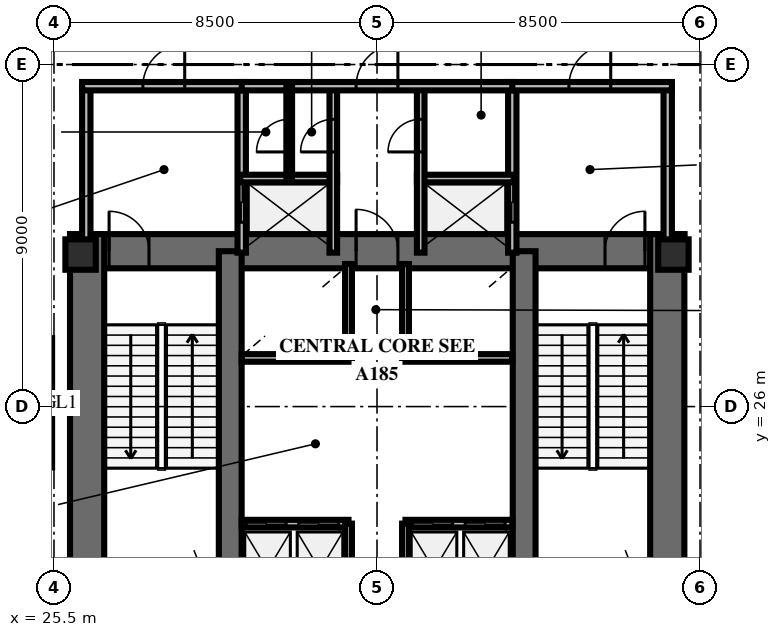
"""IFC4 building model, lengths in metres.
Left out: names, types, materials, properties, quantities, classifications, styles, units other than length and angle.
Written with IfcOpenShell. Run it as: python <this file> out.ifc"""

import sys

from ifc_helpers import new_model, si_unit, direction, frame, frame_2d, origin, origin_2d, place, context, subcontext, project, spatial, rectangle, extrude, element, fill, save


model = new_model("IFC4")
c1 = context("Model", 3, precision=1e-05, world=origin(), true_north=direction((0.0, 1.0)))
c2 = subcontext(c1, "Body", "Model", "MODEL_VIEW")
j1 = project(units=[si_unit("LENGTHUNIT", "METRE"), si_unit("PLANEANGLEUNIT", "RADIAN")], contexts=[c1])
p1 = place(None, origin())
s1 = spatial("IfcSite", under=j1, at=p1, CompositionType="ELEMENT")
p2 = place(p1, origin())
s2 = spatial("IfcBuilding", under=s1, at=p2, CompositionType="ELEMENT")
p3 = place(p2, frame((0.0, 0.0, 5.4)))
s3 = spatial("IfcBuildingStorey", under=s2, at=p3, CompositionType="ELEMENT", Elevation=5.4)
p4 = place(p3, frame((25.922, 30.088, 0.0), z_axis=(0.0, 0.0, 1.0), x_axis=(1.0, 0.0, 0.0)))
e1 = element("IfcWall", 1, at=p4, inside=s3, PredefinedType="SHEAR", context=c2, shape_type="SweptSolid", body=[
    extrude(rectangle(XDim=16.166, YDim=0.9, at=frame_2d((8.083, 0.0))), origin(), (0.0, 0.0, 1.0), 4.8),
])
p5 = place(p4, frame((1.028, 0.0, 0.0)))
e2 = element("IfcOpeningElement", 2, at=p5, cuts=e1, PredefinedType="OPENING", context=c2, shape_type="SweptSolid", body=[
    extrude(rectangle(XDim=1.05, YDim=2.15, at=frame_2d((0.525, 1.075))), frame((0.0, 0.46, 0.0), z_axis=(0.0, -1.0, 0.0), x_axis=(1.0, 0.0, 0.0)), (0.0, 0.0, 1.0), 0.92),
])
p6 = place(p4, frame((14.078, 0.0, 0.0)))
e3 = element("IfcOpeningElement", 3, at=p6, cuts=e1, PredefinedType="OPENING", context=c2, shape_type="SweptSolid", body=[
    extrude(rectangle(XDim=1.05, YDim=2.15, at=frame_2d((0.525, 1.075))), frame((0.0, 0.46, 0.0), z_axis=(0.0, -1.0, 0.0), x_axis=(1.0, 0.0, 0.0)), (0.0, 0.0, 1.0), 0.92),
])
p7 = place(p4, frame((7.528, 0.0, 0.0)))
e4 = element("IfcOpeningElement", 4, at=p7, cuts=e1, PredefinedType="OPENING", context=c2, shape_type="SweptSolid", body=[
    extrude(rectangle(XDim=1.1, YDim=2.15, at=frame_2d((0.55, 1.075))), frame((0.0, 0.46, 0.0), z_axis=(0.0, -1.0, 0.0), x_axis=(1.0, 0.0, 0.0)), (0.0, 0.0, 1.0), 0.92),
])
for number, where, z_axis, x_axis in (
    (5, (26.372, 19.662, 0.0), (0.0, 0.0, 1.0), (0.0, 1.0, 0.0)),
    (6, (41.638, 19.662, 0.0), (0.0, 0.0, 1.0), (0.0, 1.0, 0.0)),
):
    element("IfcWall", number, at=place(p3, frame(where, z_axis=z_axis, x_axis=x_axis)), inside=s3, PredefinedType="SHEAR", context=c2, shape_type="SweptSolid", body=[
        extrude(rectangle(XDim=10.876, YDim=0.9, at=frame_2d((5.438, 0.0))), origin(), (0.0, 0.0, 1.0), 4.8),
    ])
for number, where, z_axis, x_axis in (
    (7, (30.138, 20.112, 0.0), (0.0, 0.0, 1.0), (0.0, 1.0, 0.0)),
    (8, (37.872, 20.112, 0.0), (0.0, 0.0, 1.0), (0.0, 1.0, 0.0)),
):
    element("IfcWall", number, at=place(p3, frame(where, z_axis=z_axis, x_axis=x_axis)), inside=s3, PredefinedType="SHEAR", context=c2, shape_type="SweptSolid", body=[
        extrude(rectangle(XDim=9.976, YDim=0.6, at=frame_2d((4.988, 0.0))), origin(), (0.0, 0.0, 1.0), 4.8),
    ])
for number, where, z_axis, x_axis in (
    (9, (26.2, 30.0, 0.0), (0.0, 0.0, 1.0), (1.0, 0.0, 0.0)),
    (10, (41.8, 30.0, 0.0), (0.0, 0.0, 1.0), (1.0, 0.0, 0.0)),
):
    element("IfcColumn", number, at=place(p3, frame(where, z_axis=z_axis, x_axis=x_axis)), inside=s3, PredefinedType="PILASTER", context=c2, shape_type="SweptSolid", body=[
        extrude(rectangle(XDim=0.8, YDim=0.8, at=origin_2d()), origin(), (0.0, 0.0, 1.0), 4.8),
    ])
p8 = place(p3, frame((26.35, 30.05, 0.0), z_axis=(0.0, 0.0, 1.0), x_axis=(0.0, 1.0, 0.0)))
e11 = element("IfcWall", 11, at=p8, inside=s3, PredefinedType="SOLIDWALL", context=c2, shape_type="SweptSolid", body=[
    extrude(rectangle(XDim=4.38, YDim=0.22, at=frame_2d((2.19, 0.0))), origin(), (0.0, 0.0, 1.0), 3.56),
])
p9 = place(p3, frame((30.44, 30.05, 0.0), z_axis=(0.0, 0.0, 1.0), x_axis=(0.0, 1.0, 0.0)))
e12 = element("IfcWall", 12, at=p9, inside=s3, PredefinedType="SOLIDWALL", context=c2, shape_type="SweptSolid", body=[
    extrude(rectangle(XDim=4.38, YDim=0.22, at=frame_2d((2.19, 0.0))), origin(), (0.0, 0.0, 1.0), 3.56),
])
p10 = place(p9, frame((0.8, 0.0, 0.0)))
e13 = element("IfcOpeningElement", 13, at=p10, cuts=e12, PredefinedType="OPENING", context=c2, shape_type="SweptSolid", body=[
    extrude(rectangle(XDim=1.05, YDim=2.1, at=frame_2d((0.525, 1.05))), frame((0.0, 0.12, 0.0), z_axis=(0.0, -1.0, 0.0), x_axis=(1.0, 0.0, 0.0)), (0.0, 0.0, 1.0), 0.24),
])
p11 = place(p3, frame((26.24, 34.43, 0.0), z_axis=(0.0, 0.0, 1.0), x_axis=(1.0, 0.0, 0.0)))
e14 = element("IfcWall", 14, at=p11, inside=s3, PredefinedType="SOLIDWALL", context=c2, shape_type="SweptSolid", body=[
    extrude(rectangle(XDim=4.31, YDim=0.22, at=frame_2d((2.155, 0.0))), origin(), (0.0, 0.0, 1.0), 3.56),
])
p12 = place(p11, frame((1.6, 0.0, 0.0)))
e15 = element("IfcOpeningElement", 15, at=p12, cuts=e14, PredefinedType="OPENING", context=c2, shape_type="SweptSolid", body=[
    extrude(rectangle(XDim=1.1, YDim=2.15, at=frame_2d((0.55, 1.075))), frame((0.0, 0.12, 0.0), z_axis=(0.0, -1.0, 0.0), x_axis=(1.0, 0.0, 0.0)), (0.0, 0.0, 1.0), 0.24),
])
p13 = place(p3, frame((30.4, 32.0, 0.0), z_axis=(0.0, 0.0, 1.0), x_axis=(1.0, 0.0, 0.0)))
e16 = element("IfcWall", 16, at=p13, inside=s3, PredefinedType="SOLIDWALL", context=c2, shape_type="SweptSolid", body=[
    extrude(rectangle(XDim=2.55, YDim=0.2, at=frame_2d((1.275, 0.0))), origin(), (0.0, 0.0, 1.0), 3.56),
])
p14 = place(p3, frame((32.85, 30.05, 0.0), z_axis=(0.0, 0.0, 1.0), x_axis=(0.0, 1.0, 0.0)))
e17 = element("IfcWall", 17, at=p14, inside=s3, PredefinedType="SOLIDWALL", context=c2, shape_type="SweptSolid", body=[
    extrude(rectangle(XDim=4.38, YDim=0.2, at=frame_2d((2.19, 0.0))), origin(), (0.0, 0.0, 1.0), 3.56),
])
p15 = place(p14, frame((2.65, 0.0, 0.0)))
e18 = element("IfcOpeningElement", 18, at=p15, cuts=e17, PredefinedType="OPENING", context=c2, shape_type="SweptSolid", body=[
    extrude(rectangle(XDim=0.86, YDim=2.05, at=frame_2d((0.43, 1.025))), frame((0.0, 0.11, 0.0), z_axis=(0.0, -1.0, 0.0), x_axis=(1.0, 0.0, 0.0)), (0.0, 0.0, 1.0), 0.22),
])
p16 = place(p3, frame((37.56, 30.05, 0.0), z_axis=(0.0, 0.0, 1.0), x_axis=(0.0, 1.0, 0.0)))
e19 = element("IfcWall", 19, at=p16, inside=s3, PredefinedType="SOLIDWALL", context=c2, shape_type="SweptSolid", body=[
    extrude(rectangle(XDim=4.38, YDim=0.22, at=frame_2d((2.19, 0.0))), origin(), (0.0, 0.0, 1.0), 3.56),
])
p17 = place(p16, frame((0.8, 0.0, 0.0)))
e20 = element("IfcOpeningElement", 20, at=p17, cuts=e19, PredefinedType="OPENING", context=c2, shape_type="SweptSolid", body=[
    extrude(rectangle(XDim=1.05, YDim=2.1, at=frame_2d((0.525, 1.05))), frame((0.0, 0.12, 0.0), z_axis=(0.0, -1.0, 0.0), x_axis=(1.0, 0.0, 0.0)), (0.0, 0.0, 1.0), 0.24),
])
p18 = place(p3, frame((41.65, 30.05, 0.0), z_axis=(0.0, 0.0, 1.0), x_axis=(0.0, 1.0, 0.0)))
e21 = element("IfcWall", 21, at=p18, inside=s3, PredefinedType="SOLIDWALL", context=c2, shape_type="SweptSolid", body=[
    extrude(rectangle(XDim=4.38, YDim=0.22, at=frame_2d((2.19, 0.0))), origin(), (0.0, 0.0, 1.0), 3.56),
])
p19 = place(p3, frame((37.45, 34.43, 0.0), z_axis=(0.0, 0.0, 1.0), x_axis=(1.0, 0.0, 0.0)))
e22 = element("IfcWall", 22, at=p19, inside=s3, PredefinedType="SOLIDWALL", context=c2, shape_type="SweptSolid", body=[
    extrude(rectangle(XDim=4.31, YDim=0.22, at=frame_2d((2.155, 0.0))), origin(), (0.0, 0.0, 1.0), 3.56),
])
p20 = place(p19, frame((1.6, 0.0, 0.0)))
e23 = element("IfcOpeningElement", 23, at=p20, cuts=e22, PredefinedType="OPENING", context=c2, shape_type="SweptSolid", body=[
    extrude(rectangle(XDim=1.1, YDim=2.15, at=frame_2d((0.55, 1.075))), frame((0.0, 0.12, 0.0), z_axis=(0.0, -1.0, 0.0), x_axis=(1.0, 0.0, 0.0)), (0.0, 0.0, 1.0), 0.24),
])
p21 = place(p3, frame((35.05, 32.0, 0.0), z_axis=(0.0, 0.0, 1.0), x_axis=(1.0, 0.0, 0.0)))
e24 = element("IfcWall", 24, at=p21, inside=s3, PredefinedType="SOLIDWALL", context=c2, shape_type="SweptSolid", body=[
    extrude(rectangle(XDim=2.55, YDim=0.2, at=frame_2d((1.275, 0.0))), origin(), (0.0, 0.0, 1.0), 3.56),
])
p22 = place(p3, frame((35.15, 30.05, 0.0), z_axis=(0.0, 0.0, 1.0), x_axis=(0.0, 1.0, 0.0)))
e25 = element("IfcWall", 25, at=p22, inside=s3, PredefinedType="SOLIDWALL", context=c2, shape_type="SweptSolid", body=[
    extrude(rectangle(XDim=4.38, YDim=0.2, at=frame_2d((2.19, 0.0))), origin(), (0.0, 0.0, 1.0), 3.56),
])
p23 = place(p22, frame((2.65, 0.0, 0.0)))
e26 = element("IfcOpeningElement", 26, at=p23, cuts=e25, PredefinedType="OPENING", context=c2, shape_type="SweptSolid", body=[
    extrude(rectangle(XDim=0.86, YDim=2.05, at=frame_2d((0.43, 1.025))), frame((0.0, 0.11, 0.0), z_axis=(0.0, -1.0, 0.0), x_axis=(1.0, 0.0, 0.0)), (0.0, 0.0, 1.0), 0.22),
])
p24 = place(p3, frame((30.44, 34.43, 0.0), z_axis=(0.0, 0.0, 1.0), x_axis=(1.0, 0.0, 0.0)))
e27 = element("IfcWall", 27, at=p24, inside=s3, PredefinedType="SOLIDWALL", context=c2, shape_type="SweptSolid", body=[
    extrude(rectangle(XDim=7.12, YDim=0.22, at=frame_2d((3.56, 0.0))), origin(), (0.0, 0.0, 1.0), 3.56),
])
p25 = place(p24, frame((3.01, 0.0, 0.0)))
e28 = element("IfcOpeningElement", 28, at=p25, cuts=e27, PredefinedType="OPENING", context=c2, shape_type="SweptSolid", body=[
    extrude(rectangle(XDim=1.1, YDim=2.15, at=frame_2d((0.55, 1.075))), frame((0.0, 0.12, 0.0), z_axis=(0.0, -1.0, 0.0), x_axis=(1.0, 0.0, 0.0)), (0.0, 0.0, 1.0), 0.24),
])
p26 = place(p3, frame((31.69, 32.05, 0.0), z_axis=(0.0, 0.0, 1.0), x_axis=(0.0, 1.0, 0.0)))
e29 = element("IfcWall", 29, at=p26, inside=s3, PredefinedType="PARTITIONING", context=c2, shape_type="SweptSolid", body=[
    extrude(rectangle(XDim=2.33, YDim=0.15, at=frame_2d((1.165, 0.0))), origin(), (0.0, 0.0, 1.0), 3.56),
])
p27 = place(p26, frame((0.65, 0.0, 0.0)))
e30 = element("IfcOpeningElement", 30, at=p27, cuts=e29, PredefinedType="OPENING", context=c2, shape_type="SweptSolid", body=[
    extrude(rectangle(XDim=0.86, YDim=2.05, at=frame_2d((0.43, 1.025))), frame((0.0, 0.085, 0.0), z_axis=(0.0, -1.0, 0.0), x_axis=(1.0, 0.0, 0.0)), (0.0, 0.0, 1.0), 0.17),
])
p28 = place(p3, frame((30.44, 22.92, 0.0), z_axis=(0.0, 0.0, 1.0), x_axis=(1.0, 0.0, 0.0)))
e31 = element("IfcWall", 31, at=p28, inside=s3, PredefinedType="SOLIDWALL", context=c2, shape_type="SweptSolid", body=[
    extrude(rectangle(XDim=2.81, YDim=0.2, at=frame_2d((1.405, 0.0))), origin(), (0.0, 0.0, 1.0), 3.56),
])
p29 = place(p28, frame((0.12, 0.0, 0.0)))
e32 = element("IfcOpeningElement", 32, at=p29, cuts=e31, PredefinedType="OPENING", context=c2, shape_type="SweptSolid", body=[
    extrude(rectangle(XDim=1.05, YDim=2.1, at=frame_2d((0.525, 1.05))), frame((0.0, 0.11, 0.0), z_axis=(0.0, -1.0, 0.0), x_axis=(1.0, 0.0, 0.0)), (0.0, 0.0, 1.0), 0.22),
])
p30 = place(p28, frame((1.5, 0.0, 0.0)))
e33 = element("IfcOpeningElement", 33, at=p30, cuts=e31, PredefinedType="OPENING", context=c2, shape_type="SweptSolid", body=[
    extrude(rectangle(XDim=1.05, YDim=2.1, at=frame_2d((0.525, 1.05))), frame((0.0, 0.11, 0.0), z_axis=(0.0, -1.0, 0.0), x_axis=(1.0, 0.0, 0.0)), (0.0, 0.0, 1.0), 0.22),
])
p31 = place(p3, frame((33.25, 20.5, 0.0), z_axis=(0.0, 0.0, 1.0), x_axis=(0.0, 1.0, 0.0)))
e34 = element("IfcWall", 34, at=p31, inside=s3, PredefinedType="SOLIDWALL", context=c2, shape_type="SweptSolid", body=[
    extrude(rectangle(XDim=2.42, YDim=0.18, at=frame_2d((1.21, 0.0))), origin(), (0.0, 0.0, 1.0), 3.56),
])
p32 = place(p3, frame((34.75, 22.92, 0.0), z_axis=(0.0, 0.0, 1.0), x_axis=(1.0, 0.0, 0.0)))
e35 = element("IfcWall", 35, at=p32, inside=s3, PredefinedType="SOLIDWALL", context=c2, shape_type="SweptSolid", body=[
    extrude(rectangle(XDim=2.81, YDim=0.2, at=frame_2d((1.405, 0.0))), origin(), (0.0, 0.0, 1.0), 3.56),
])
p33 = place(p32, frame((0.19, 0.0, 0.0)))
e36 = element("IfcOpeningElement", 36, at=p33, cuts=e35, PredefinedType="OPENING", context=c2, shape_type="SweptSolid", body=[
    extrude(rectangle(XDim=1.05, YDim=2.1, at=frame_2d((0.525, 1.05))), frame((0.0, 0.11, 0.0), z_axis=(0.0, -1.0, 0.0), x_axis=(1.0, 0.0, 0.0)), (0.0, 0.0, 1.0), 0.22),
])
p34 = place(p32, frame((1.57, 0.0, 0.0)))
e37 = element("IfcOpeningElement", 37, at=p34, cuts=e35, PredefinedType="OPENING", context=c2, shape_type="SweptSolid", body=[
    extrude(rectangle(XDim=1.05, YDim=2.1, at=frame_2d((0.525, 1.05))), frame((0.0, 0.11, 0.0), z_axis=(0.0, -1.0, 0.0), x_axis=(1.0, 0.0, 0.0)), (0.0, 0.0, 1.0), 0.22),
])
p35 = place(p3, frame((34.75, 20.5, 0.0), z_axis=(0.0, 0.0, 1.0), x_axis=(0.0, 1.0, 0.0)))
e38 = element("IfcWall", 38, at=p35, inside=s3, PredefinedType="SOLIDWALL", context=c2, shape_type="SweptSolid", body=[
    extrude(rectangle(XDim=2.42, YDim=0.18, at=frame_2d((1.21, 0.0))), origin(), (0.0, 0.0, 1.0), 3.56),
])
p36 = place(p3, frame((30.44, 27.28, 0.0), z_axis=(0.0, 0.0, 1.0), x_axis=(1.0, 0.0, 0.0)))
e39 = element("IfcWall", 39, at=p36, inside=s3, PredefinedType="SOLIDWALL", context=c2, shape_type="SweptSolid", body=[
    extrude(rectangle(XDim=2.81, YDim=0.2, at=frame_2d((1.405, 0.0))), origin(), (0.0, 0.0, 1.0), 3.56),
])
p37 = place(p3, frame((33.25, 27.28, 0.0), z_axis=(0.0, 0.0, 1.0), x_axis=(0.0, 1.0, 0.0)))
e40 = element("IfcWall", 40, at=p37, inside=s3, PredefinedType="SOLIDWALL", context=c2, shape_type="SweptSolid", body=[
    extrude(rectangle(XDim=2.47, YDim=0.18, at=frame_2d((1.235, 0.0))), origin(), (0.0, 0.0, 1.0), 3.56),
])
p38 = place(p3, frame((34.75, 27.28, 0.0), z_axis=(0.0, 0.0, 1.0), x_axis=(1.0, 0.0, 0.0)))
e41 = element("IfcWall", 41, at=p38, inside=s3, PredefinedType="SOLIDWALL", context=c2, shape_type="SweptSolid", body=[
    extrude(rectangle(XDim=2.81, YDim=0.2, at=frame_2d((1.405, 0.0))), origin(), (0.0, 0.0, 1.0), 3.56),
])
p39 = place(p3, frame((34.75, 27.28, 0.0), z_axis=(0.0, 0.0, 1.0), x_axis=(0.0, 1.0, 0.0)))
e42 = element("IfcWall", 42, at=p39, inside=s3, PredefinedType="SOLIDWALL", context=c2, shape_type="SweptSolid", body=[
    extrude(rectangle(XDim=2.47, YDim=0.18, at=frame_2d((1.235, 0.0))), origin(), (0.0, 0.0, 1.0), 3.56),
])
p40 = place(p5, origin())
e43 = element("IfcDoor", 43, at=p40, inside=s3, OperationType="SINGLE_SWING_LEFT", PredefinedType="DOOR", context=c2, shape_type="SweptSolid", body=[
    extrude(rectangle(XDim=1.05, YDim=2.15, at=frame_2d((0.525, 1.075))), frame((0.0, 0.025, 0.0), z_axis=(0.0, -1.0, 0.0), x_axis=(1.0, 0.0, 0.0)), (0.0, 0.0, 1.0), 0.05),
])
fill(e2, e43)
p41 = place(p6, origin())
e44 = element("IfcDoor", 44, at=p41, inside=s3, OperationType="SINGLE_SWING_RIGHT", PredefinedType="DOOR", context=c2, shape_type="SweptSolid", body=[
    extrude(rectangle(XDim=1.05, YDim=2.15, at=frame_2d((0.525, 1.075))), frame((0.0, 0.025, 0.0), z_axis=(0.0, -1.0, 0.0), x_axis=(1.0, 0.0, 0.0)), (0.0, 0.0, 1.0), 0.05),
])
fill(e3, e44)
p42 = place(p7, origin())
e45 = element("IfcDoor", 45, at=p42, inside=s3, OperationType="SINGLE_SWING_LEFT", PredefinedType="DOOR", context=c2, shape_type="SweptSolid", body=[
    extrude(rectangle(XDim=1.1, YDim=2.15, at=frame_2d((0.55, 1.075))), frame((0.0, 0.025, 0.0), z_axis=(0.0, -1.0, 0.0), x_axis=(1.0, 0.0, 0.0)), (0.0, 0.0, 1.0), 0.05),
])
fill(e4, e45)
p43 = place(p12, origin())
e46 = element("IfcDoor", 46, at=p43, inside=s3, OperationType="SINGLE_SWING_RIGHT", PredefinedType="DOOR", context=c2, shape_type="SweptSolid", body=[
    extrude(rectangle(XDim=1.1, YDim=2.15, at=frame_2d((0.55, 1.075))), frame((0.0, 0.025, 0.0), z_axis=(0.0, -1.0, 0.0), x_axis=(1.0, 0.0, 0.0)), (0.0, 0.0, 1.0), 0.05),
])
fill(e15, e46)
p44 = place(p10, origin())
e47 = element("IfcDoor", 47, at=p44, inside=s3, OperationType="DOUBLE_DOOR_SLIDING", PredefinedType="USERDEFINED", context=c2, shape_type="SweptSolid", body=[
    extrude(rectangle(XDim=1.05, YDim=2.1, at=frame_2d((0.525, 1.05))), frame((0.0, 0.025, 0.0), z_axis=(0.0, -1.0, 0.0), x_axis=(1.0, 0.0, 0.0)), (0.0, 0.0, 1.0), 0.05),
])
fill(e13, e47)
p45 = place(p15, origin())
e48 = element("IfcDoor", 48, at=p45, inside=s3, OperationType="SINGLE_SWING_LEFT", PredefinedType="TRAPDOOR", context=c2, shape_type="SweptSolid", body=[
    extrude(rectangle(XDim=0.86, YDim=2.05, at=frame_2d((0.43, 1.025))), frame((0.0, 0.025, 0.0), z_axis=(0.0, -1.0, 0.0), x_axis=(1.0, 0.0, 0.0)), (0.0, 0.0, 1.0), 0.05),
])
fill(e18, e48)
p46 = place(p20, origin())
e49 = element("IfcDoor", 49, at=p46, inside=s3, OperationType="SINGLE_SWING_RIGHT", PredefinedType="DOOR", context=c2, shape_type="SweptSolid", body=[
    extrude(rectangle(XDim=1.1, YDim=2.15, at=frame_2d((0.55, 1.075))), frame((0.0, 0.025, 0.0), z_axis=(0.0, -1.0, 0.0), x_axis=(1.0, 0.0, 0.0)), (0.0, 0.0, 1.0), 0.05),
])
fill(e23, e49)
p47 = place(p17, origin())
e50 = element("IfcDoor", 50, at=p47, inside=s3, OperationType="DOUBLE_DOOR_SLIDING", PredefinedType="USERDEFINED", context=c2, shape_type="SweptSolid", body=[
    extrude(rectangle(XDim=1.05, YDim=2.1, at=frame_2d((0.525, 1.05))), frame((0.0, 0.025, 0.0), z_axis=(0.0, -1.0, 0.0), x_axis=(1.0, 0.0, 0.0)), (0.0, 0.0, 1.0), 0.05),
])
fill(e20, e50)
p48 = place(p23, origin())
e51 = element("IfcDoor", 51, at=p48, inside=s3, OperationType="SINGLE_SWING_LEFT", PredefinedType="TRAPDOOR", context=c2, shape_type="SweptSolid", body=[
    extrude(rectangle(XDim=0.86, YDim=2.05, at=frame_2d((0.43, 1.025))), frame((0.0, 0.025, 0.0), z_axis=(0.0, -1.0, 0.0), x_axis=(1.0, 0.0, 0.0)), (0.0, 0.0, 1.0), 0.05),
])
fill(e26, e51)
p49 = place(p25, origin())
e52 = element("IfcDoor", 52, at=p49, inside=s3, OperationType="SINGLE_SWING_RIGHT", PredefinedType="DOOR", context=c2, shape_type="SweptSolid", body=[
    extrude(rectangle(XDim=1.1, YDim=2.15, at=frame_2d((0.55, 1.075))), frame((0.0, 0.025, 0.0), z_axis=(0.0, -1.0, 0.0), x_axis=(1.0, 0.0, 0.0)), (0.0, 0.0, 1.0), 0.05),
])
fill(e28, e52)
p50 = place(p27, origin())
e53 = element("IfcDoor", 53, at=p50, inside=s3, OperationType="SINGLE_SWING_LEFT", PredefinedType="TRAPDOOR", context=c2, shape_type="SweptSolid", body=[
    extrude(rectangle(XDim=0.86, YDim=2.05, at=frame_2d((0.43, 1.025))), frame((0.0, 0.025, 0.0), z_axis=(0.0, -1.0, 0.0), x_axis=(1.0, 0.0, 0.0)), (0.0, 0.0, 1.0), 0.05),
])
fill(e30, e53)
p51 = place(p29, origin())
e54 = element("IfcDoor", 54, at=p51, inside=s3, OperationType="DOUBLE_DOOR_SLIDING", PredefinedType="USERDEFINED", context=c2, shape_type="SweptSolid", body=[
    extrude(rectangle(XDim=1.05, YDim=2.1, at=frame_2d((0.525, 1.05))), frame((0.0, 0.025, 0.0), z_axis=(0.0, -1.0, 0.0), x_axis=(1.0, 0.0, 0.0)), (0.0, 0.0, 1.0), 0.05),
])
fill(e32, e54)
p52 = place(p30, origin())
e55 = element("IfcDoor", 55, at=p52, inside=s3, OperationType="DOUBLE_DOOR_SLIDING", PredefinedType="USERDEFINED", context=c2, shape_type="SweptSolid", body=[
    extrude(rectangle(XDim=1.05, YDim=2.1, at=frame_2d((0.525, 1.05))), frame((0.0, 0.025, 0.0), z_axis=(0.0, -1.0, 0.0), x_axis=(1.0, 0.0, 0.0)), (0.0, 0.0, 1.0), 0.05),
])
fill(e33, e55)
p53 = place(p33, origin())
e56 = element("IfcDoor", 56, at=p53, inside=s3, OperationType="DOUBLE_DOOR_SLIDING", PredefinedType="USERDEFINED", context=c2, shape_type="SweptSolid", body=[
    extrude(rectangle(XDim=1.05, YDim=2.1, at=frame_2d((0.525, 1.05))), frame((0.0, 0.025, 0.0), z_axis=(0.0, -1.0, 0.0), x_axis=(1.0, 0.0, 0.0)), (0.0, 0.0, 1.0), 0.05),
])
fill(e36, e56)
p54 = place(p34, origin())
e57 = element("IfcDoor", 57, at=p54, inside=s3, OperationType="DOUBLE_DOOR_SLIDING", PredefinedType="USERDEFINED", context=c2, shape_type="SweptSolid", body=[
    extrude(rectangle(XDim=1.05, YDim=2.1, at=frame_2d((0.525, 1.05))), frame((0.0, 0.025, 0.0), z_axis=(0.0, -1.0, 0.0), x_axis=(1.0, 0.0, 0.0)), (0.0, 0.0, 1.0), 0.05),
])
fill(e37, e57)
save(model, sys.argv[1])
